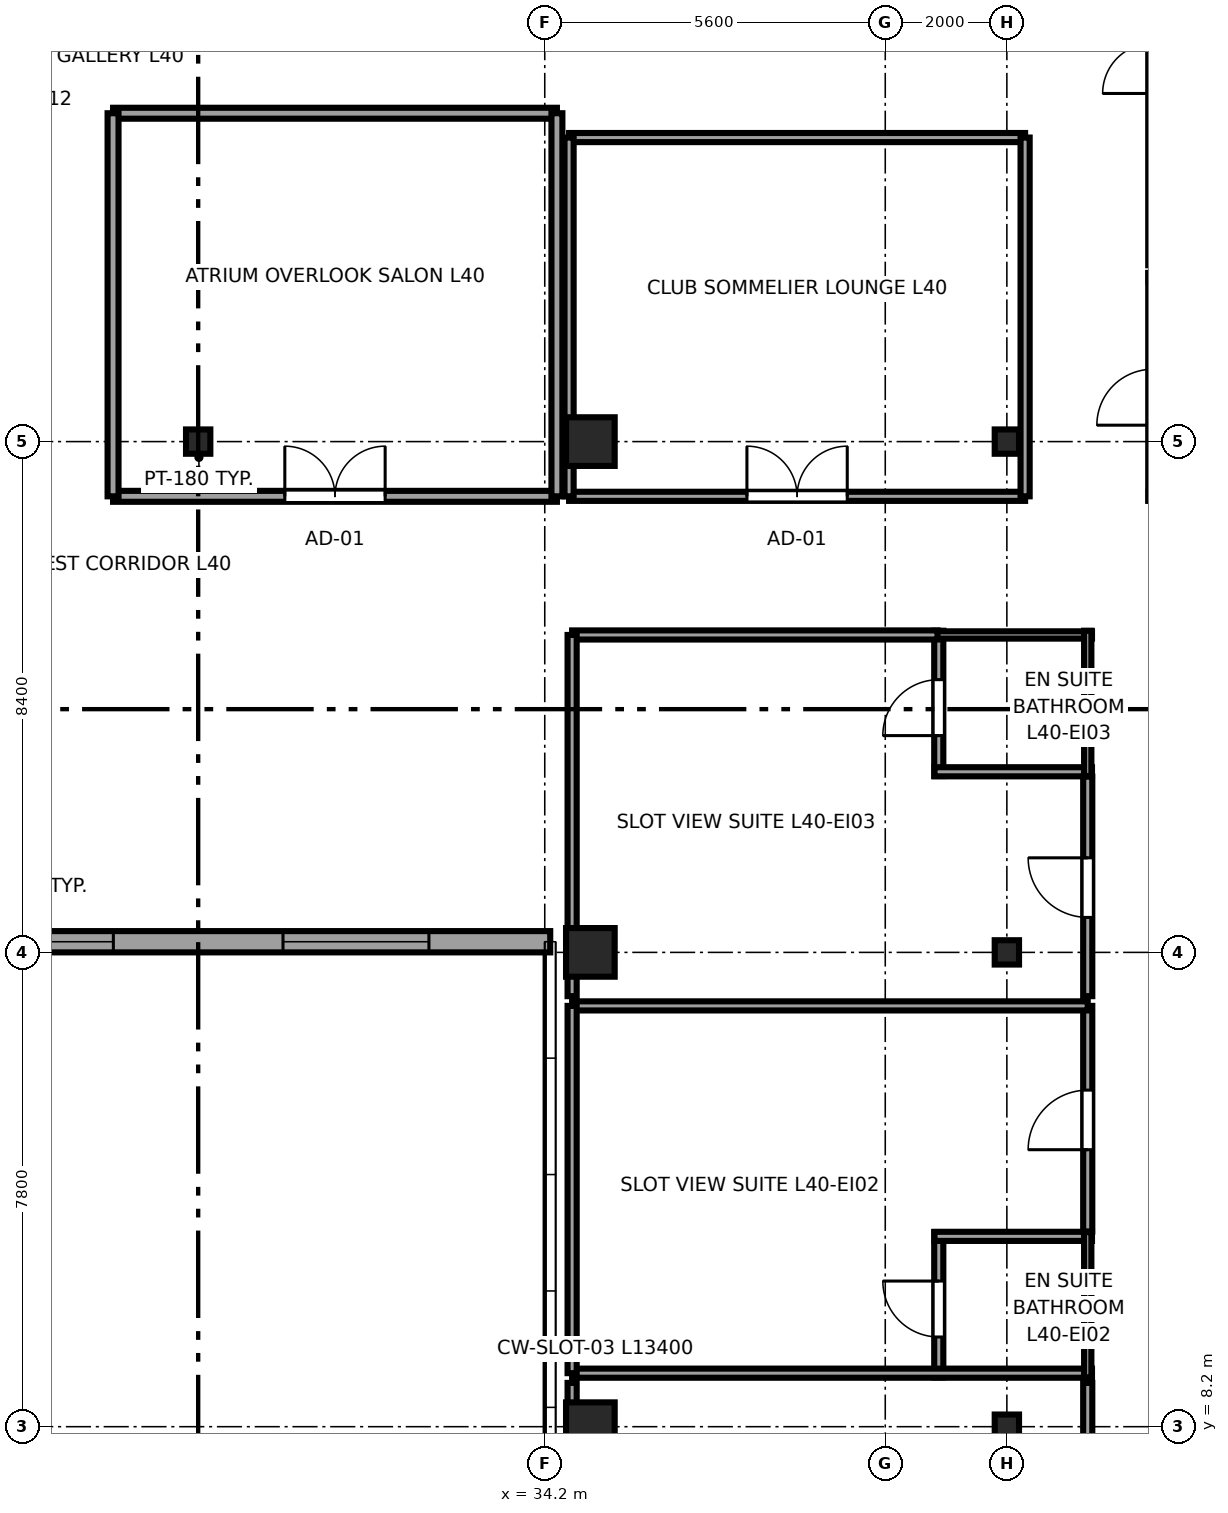
"""IFC4 building model, lengths in metres.
Left out: names, types, materials, properties, quantities, classifications, styles, units other than length and angle.
Written with IfcOpenShell. Run it as: python <this file> out.ifc"""

import sys

from ifc_helpers import new_model, si_unit, direction, frame, frame_2d, origin, origin_2d, place, context, subcontext, project, spatial, rectangle, i_section, extrude, source, transform, mapped, element, fill, save


model = new_model("IFC4")
c1 = context("Model", 3, precision=1e-05, world=origin(), true_north=direction((0.0, 1.0)))
c2 = subcontext(c1, "Body", "Model", "MODEL_VIEW")
j1 = project(units=[si_unit("LENGTHUNIT", "METRE"), si_unit("PLANEANGLEUNIT", "RADIAN")], contexts=[c1])
p1 = place(None, origin())
s1 = spatial("IfcSite", under=j1, at=p1, CompositionType="ELEMENT")
p2 = place(p1, origin())
s2 = spatial("IfcBuilding", under=s1, at=p2, CompositionType="ELEMENT")
p3 = place(p2, frame((0.0, 0.0, 154.15)))
s3 = spatial("IfcBuildingStorey", under=s2, at=p3, CompositionType="ELEMENT", Elevation=154.15)
m1 = source(origin(), c2, "Body", "SweptSolid", [
    extrude(rectangle(XDim=0.8, YDim=0.8, at=origin_2d()), origin(), (0.0, 0.0, 1.0), 3.55),
])
for number, where, z_axis, x_axis in (
    (1, (34.95, 8.2, 0.0), (0.0, 0.0, 1.0), (1.0, 0.0, 0.0)),
    (2, (34.95, 16.0, 0.0), (0.0, 0.0, 1.0), (1.0, 0.0, 0.0)),
    (3, (34.95, 24.4, 0.0), (0.0, 0.0, 1.0), (1.0, 0.0, 0.0)),
):
    element("IfcColumn", number, at=place(p3, frame(where, z_axis=z_axis, x_axis=x_axis)), inside=s3, PredefinedType="COLUMN", context=c2, shape_type="MappedRepresentation", body=[
        mapped(m1, transform((0.0, 0.0, 0.0), x_axis=(1.0, 0.0, 0.0), y_axis=(0.0, 1.0, 0.0), z_axis=(0.0, 0.0, 1.0), scale=1.0)),
    ])
m2 = source(origin(), c2, "Body", "SweptSolid", [
    extrude(i_section(OverallWidth=0.4, OverallDepth=0.4, WebThickness=0.02, FlangeThickness=0.035, at=origin_2d()), origin(), (0.0, 0.0, 1.0), 3.55),
])
for number, where, z_axis, x_axis in (
    (4, (41.8, 8.2, 0.0), (0.0, 0.0, 1.0), (1.0, 0.0, 0.0)),
    (5, (41.8, 16.0, 0.0), (0.0, 0.0, 1.0), (1.0, 0.0, 0.0)),
    (6, (41.8, 24.4, 0.0), (0.0, 0.0, 1.0), (1.0, 0.0, 0.0)),
    (7, (28.5, 24.4, 0.0), (0.0, 0.0, 1.0), (1.0, 0.0, 0.0)),
):
    element("IfcColumn", number, at=place(p3, frame(where, z_axis=z_axis, x_axis=x_axis)), inside=s3, PredefinedType="COLUMN", context=c2, shape_type="MappedRepresentation", body=[
        mapped(m2, transform((0.0, 0.0, 0.0), x_axis=(1.0, 0.0, 0.0), y_axis=(0.0, 1.0, 0.0), z_axis=(0.0, 0.0, 1.0), scale=1.0)),
    ])
p4 = place(p3, frame((22.71, 16.175, 0.0), z_axis=(0.0, 0.0, 1.0), x_axis=(1.0, 0.0, 0.0)))
e8 = element("IfcWall", 8, at=p4, inside=s3, PredefinedType="SOLIDWALL", context=c2, shape_type="SweptSolid", body=[
    extrude(rectangle(XDim=11.58, YDim=0.35, at=frame_2d((5.79, 0.0))), origin(), (0.0, 0.0, 1.0), 2.758),
])
p5 = place(p4, frame((1.995, 0.0, 0.68)))
e9 = element("IfcOpeningElement", 9, at=p5, cuts=e8, PredefinedType="OPENING", context=c2, shape_type="SweptSolid", body=[
    extrude(rectangle(XDim=2.4, YDim=1.9, at=frame_2d((1.2, 0.95))), frame((0.0, 0.185, 0.0), z_axis=(0.0, -1.0, 0.0), x_axis=(1.0, 0.0, 0.0)), (0.0, 0.0, 1.0), 0.37),
])
p6 = place(p4, frame((7.185, 0.0, 0.68)))
e10 = element("IfcOpeningElement", 10, at=p6, cuts=e8, PredefinedType="OPENING", context=c2, shape_type="SweptSolid", body=[
    extrude(rectangle(XDim=2.4, YDim=1.9, at=frame_2d((1.2, 0.95))), frame((0.0, 0.185, 0.0), z_axis=(0.0, -1.0, 0.0), x_axis=(1.0, 0.0, 0.0)), (0.0, 0.0, 1.0), 0.37),
])
p7 = place(p3, frame((40.68, 9.01, 0.0), z_axis=(0.0, 0.0, 1.0), x_axis=(0.0, 1.0, 0.0)))
e11 = element("IfcWall", 11, at=p7, inside=s3, PredefinedType="PARTITIONING", context=c2, shape_type="SweptSolid", body=[
    extrude(rectangle(XDim=2.39, YDim=0.15, at=frame_2d((1.195, 0.0))), origin(), (0.0, 0.0, 1.0), 3.37),
])
p8 = place(p7, frame((0.665, 0.0, 0.0)))
e12 = element("IfcOpeningElement", 12, at=p8, cuts=e11, PredefinedType="OPENING", context=c2, shape_type="SweptSolid", body=[
    extrude(rectangle(XDim=0.92, YDim=2.01, at=frame_2d((0.46, 1.005))), frame((0.0, 0.085, 0.0), z_axis=(0.0, -1.0, 0.0), x_axis=(1.0, 0.0, 0.0)), (0.0, 0.0, 1.0), 0.17),
])
p9 = place(p3, frame((34.65, 9.08, 0.0), z_axis=(0.0, 0.0, 1.0), x_axis=(1.0, 0.0, 0.0)))
e13 = element("IfcWall", 13, at=p9, inside=s3, PredefinedType="PARTITIONING", context=c2, shape_type="SweptSolid", body=[
    extrude(rectangle(XDim=8.55, YDim=0.15, at=frame_2d((4.275, 0.0))), origin(), (0.0, 0.0, 1.0), 3.37),
])
p10 = place(p3, frame((40.61, 11.33, 0.0), z_axis=(0.0, 0.0, 1.0), x_axis=(1.0, 0.0, 0.0)))
e14 = element("IfcWall", 14, at=p10, inside=s3, PredefinedType="PARTITIONING", context=c2, shape_type="SweptSolid", body=[
    extrude(rectangle(XDim=2.59, YDim=0.15, at=frame_2d((1.295, 0.0))), origin(), (0.0, 0.0, 1.0), 3.37),
])
p11 = place(p3, frame((43.13, 9.01, 0.0), z_axis=(0.0, 0.0, 1.0), x_axis=(0.0, 1.0, 0.0)))
e15 = element("IfcWall", 15, at=p11, inside=s3, PredefinedType="PLUMBINGWALL", context=c2, shape_type="SweptSolid", body=[
    extrude(rectangle(XDim=2.39, YDim=0.12, at=frame_2d((1.195, 0.0))), origin(), (0.0, 0.0, 1.0), 3.37),
])
p12 = place(p3, frame((40.68, 18.9, 0.0), z_axis=(0.0, 0.0, 1.0), x_axis=(0.0, 1.0, 0.0)))
e16 = element("IfcWall", 16, at=p12, inside=s3, PredefinedType="PARTITIONING", context=c2, shape_type="SweptSolid", body=[
    extrude(rectangle(XDim=2.39, YDim=0.15, at=frame_2d((1.195, 0.0))), origin(), (0.0, 0.0, 1.0), 3.37),
])
p13 = place(p12, frame((0.665, 0.0, 0.0)))
e17 = element("IfcOpeningElement", 17, at=p13, cuts=e16, PredefinedType="OPENING", context=c2, shape_type="SweptSolid", body=[
    extrude(rectangle(XDim=0.92, YDim=2.01, at=frame_2d((0.46, 1.005))), frame((0.0, 0.085, 0.0), z_axis=(0.0, -1.0, 0.0), x_axis=(1.0, 0.0, 0.0)), (0.0, 0.0, 1.0), 0.17),
])
p14 = place(p3, frame((40.61, 18.97, 0.0), z_axis=(0.0, 0.0, 1.0), x_axis=(1.0, 0.0, 0.0)))
e18 = element("IfcWall", 18, at=p14, inside=s3, PredefinedType="PARTITIONING", context=c2, shape_type="SweptSolid", body=[
    extrude(rectangle(XDim=2.59, YDim=0.15, at=frame_2d((1.295, 0.0))), origin(), (0.0, 0.0, 1.0), 3.37),
])
p15 = place(p3, frame((40.61, 21.22, 0.0), z_axis=(0.0, 0.0, 1.0), x_axis=(1.0, 0.0, 0.0)))
e19 = element("IfcWall", 19, at=p15, inside=s3, PredefinedType="PLUMBINGWALL", context=c2, shape_type="SweptSolid", body=[
    extrude(rectangle(XDim=2.59, YDim=0.12, at=frame_2d((1.295, 0.0))), origin(), (0.0, 0.0, 1.0), 3.37),
])
p16 = place(p3, frame((43.13, 18.9, 0.0), z_axis=(0.0, 0.0, 1.0), x_axis=(0.0, 1.0, 0.0)))
e20 = element("IfcWall", 20, at=p16, inside=s3, PredefinedType="PLUMBINGWALL", context=c2, shape_type="SweptSolid", body=[
    extrude(rectangle(XDim=2.39, YDim=0.12, at=frame_2d((1.195, 0.0))), origin(), (0.0, 0.0, 1.0), 3.37),
])
p17 = place(p3, frame((43.13, 5.91, 0.0), z_axis=(0.0, 0.0, 1.0), x_axis=(0.0, 1.0, 0.0)))
e21 = element("IfcWall", 21, at=p17, inside=s3, PredefinedType="PARTITIONING", context=c2, shape_type="SweptSolid", body=[
    extrude(rectangle(XDim=3.01, YDim=0.15, at=frame_2d((1.505, 0.0))), origin(), (0.0, 0.0, 1.0), 3.37),
])
p18 = place(p17, frame((0.995, 0.0, 0.0)))
e22 = element("IfcOpeningElement", 22, at=p18, cuts=e21, PredefinedType="OPENING", context=c2, shape_type="SweptSolid", body=[
    extrude(rectangle(XDim=0.98, YDim=2.12, at=frame_2d((0.49, 1.06))), frame((0.0, 0.085, 0.0), z_axis=(0.0, -1.0, 0.0), x_axis=(1.0, 0.0, 0.0)), (0.0, 0.0, 1.0), 0.17),
])
p19 = place(p3, frame((34.65, 3.005, 0.0), z_axis=(0.0, 0.0, 1.0), x_axis=(0.0, 1.0, 0.0)))
e23 = element("IfcWall", 23, at=p19, inside=s3, PredefinedType="PARTITIONING", context=c2, shape_type="SweptSolid", body=[
    extrude(rectangle(XDim=5.915, YDim=0.15, at=frame_2d((2.958, 0.0))), origin(), (0.0, 0.0, 1.0), 3.37),
])
p20 = place(p3, frame((43.13, 11.41, 0.0), z_axis=(0.0, 0.0, 1.0), x_axis=(0.0, 1.0, 0.0)))
e24 = element("IfcWall", 24, at=p20, inside=s3, PredefinedType="PARTITIONING", context=c2, shape_type="SweptSolid", body=[
    extrude(rectangle(XDim=3.71, YDim=0.15, at=frame_2d((1.855, 0.0))), origin(), (0.0, 0.0, 1.0), 3.37),
])
p21 = place(p20, frame((1.345, 0.0, 0.0)))
e25 = element("IfcOpeningElement", 25, at=p21, cuts=e24, PredefinedType="OPENING", context=c2, shape_type="SweptSolid", body=[
    extrude(rectangle(XDim=0.98, YDim=2.12, at=frame_2d((0.49, 1.06))), frame((0.0, 0.085, 0.0), z_axis=(0.0, -1.0, 0.0), x_axis=(1.0, 0.0, 0.0)), (0.0, 0.0, 1.0), 0.17),
])
p22 = place(p3, frame((34.65, 15.12, 0.0), z_axis=(0.0, 0.0, 1.0), x_axis=(1.0, 0.0, 0.0)))
e26 = element("IfcWall", 26, at=p22, inside=s3, PredefinedType="PARTITIONING", context=c2, shape_type="SweptSolid", body=[
    extrude(rectangle(XDim=8.48, YDim=0.15, at=frame_2d((4.24, 0.0))), origin(), (0.0, 0.0, 1.0), 3.37),
])
p23 = place(p3, frame((34.65, 9.08, 0.0), z_axis=(0.0, 0.0, 1.0), x_axis=(0.0, 1.0, 0.0)))
e27 = element("IfcWall", 27, at=p23, inside=s3, PredefinedType="PARTITIONING", context=c2, shape_type="SweptSolid", body=[
    extrude(rectangle(XDim=6.04, YDim=0.15, at=frame_2d((3.02, 0.0))), origin(), (0.0, 0.0, 1.0), 3.37),
])
p24 = place(p3, frame((43.13, 15.28, 0.0), z_axis=(0.0, 0.0, 1.0), x_axis=(0.0, 1.0, 0.0)))
e28 = element("IfcWall", 28, at=p24, inside=s3, PredefinedType="PARTITIONING", context=c2, shape_type="SweptSolid", body=[
    extrude(rectangle(XDim=3.61, YDim=0.15, at=frame_2d((1.805, 0.0))), origin(), (0.0, 0.0, 1.0), 3.37),
])
p25 = place(p24, frame((1.295, 0.0, 0.0)))
e29 = element("IfcOpeningElement", 29, at=p25, cuts=e28, PredefinedType="OPENING", context=c2, shape_type="SweptSolid", body=[
    extrude(rectangle(XDim=0.98, YDim=2.12, at=frame_2d((0.49, 1.06))), frame((0.0, 0.085, 0.0), z_axis=(0.0, -1.0, 0.0), x_axis=(1.0, 0.0, 0.0)), (0.0, 0.0, 1.0), 0.17),
])
p26 = place(p3, frame((34.65, 21.22, 0.0), z_axis=(0.0, 0.0, 1.0), x_axis=(1.0, 0.0, 0.0)))
e30 = element("IfcWall", 30, at=p26, inside=s3, PredefinedType="PARTITIONING", context=c2, shape_type="SweptSolid", body=[
    extrude(rectangle(XDim=6.01, YDim=0.15, at=frame_2d((3.005, 0.0))), origin(), (0.0, 0.0, 1.0), 3.37),
])
p27 = place(p3, frame((34.65, 15.28, 0.0), z_axis=(0.0, 0.0, 1.0), x_axis=(0.0, 1.0, 0.0)))
e31 = element("IfcWall", 31, at=p27, inside=s3, PredefinedType="PARTITIONING", context=c2, shape_type="SweptSolid", body=[
    extrude(rectangle(XDim=5.94, YDim=0.15, at=frame_2d((2.97, 0.0))), origin(), (0.0, 0.0, 1.0), 3.37),
])
p28 = place(p3, frame((44.2, 23.43, 0.0), z_axis=(0.0, 0.0, 1.0), x_axis=(0.0, 1.0, 0.0)))
e32 = element("IfcWall", 32, at=p28, inside=s3, PredefinedType="PARTITIONING", context=c2, shape_type="SweptSolid", body=[
    extrude(rectangle(XDim=3.74, YDim=0.15, at=frame_2d((1.87, 0.0))), origin(), (0.0, 0.0, 1.0), 3.37),
])
p29 = place(p28, frame((1.24, 0.0, 0.0)))
e33 = element("IfcOpeningElement", 33, at=p29, cuts=e32, PredefinedType="OPENING", context=c2, shape_type="SweptSolid", body=[
    extrude(rectangle(XDim=0.92, YDim=2.01, at=frame_2d((0.46, 1.005))), frame((0.0, 0.085, 0.0), z_axis=(0.0, -1.0, 0.0), x_axis=(1.0, 0.0, 0.0)), (0.0, 0.0, 1.0), 0.17),
])
p30 = place(p3, frame((44.2, 27.3, 0.0), z_axis=(0.0, 0.0, 1.0), x_axis=(0.0, 1.0, 0.0)))
e34 = element("IfcWall", 34, at=p30, inside=s3, PredefinedType="PARTITIONING", context=c2, shape_type="SweptSolid", body=[
    extrude(rectangle(XDim=7.3, YDim=0.15, at=frame_2d((3.65, 0.0))), origin(), (0.0, 0.0, 1.0), 3.37),
])
p31 = place(p30, frame((2.825, 0.0, 0.0)))
e35 = element("IfcOpeningElement", 35, at=p31, cuts=e34, PredefinedType="OPENING", context=c2, shape_type="SweptSolid", body=[
    extrude(rectangle(XDim=1.65, YDim=2.15, at=frame_2d((0.825, 1.075))), frame((0.0, 0.085, 0.0), z_axis=(0.0, -1.0, 0.0), x_axis=(1.0, 0.0, 0.0)), (0.0, 0.0, 1.0), 0.17),
])
p32 = place(p3, frame((27.1, 23.5, 0.0), z_axis=(0.0, 0.0, 1.0), x_axis=(1.0, 0.0, 0.0)))
e36 = element("IfcWall", 36, at=p32, inside=s3, PredefinedType="PARTITIONING", context=c2, shape_type="SweptSolid", body=[
    extrude(rectangle(XDim=7.3, YDim=0.18, at=frame_2d((3.65, 0.0))), origin(), (0.0, 0.0, 1.0), 3.37),
])
p33 = place(p32, frame((2.825, 0.0, 0.0)))
e37 = element("IfcOpeningElement", 37, at=p33, cuts=e36, PredefinedType="OPENING", context=c2, shape_type="SweptSolid", body=[
    extrude(rectangle(XDim=1.65, YDim=2.15, at=frame_2d((0.825, 1.075))), frame((0.0, 0.1, 0.0), z_axis=(0.0, -1.0, 0.0), x_axis=(1.0, 0.0, 0.0)), (0.0, 0.0, 1.0), 0.2),
])
p34 = place(p3, frame((27.1, 29.8, 0.0), z_axis=(0.0, 0.0, 1.0), x_axis=(1.0, 0.0, 0.0)))
e38 = element("IfcWall", 38, at=p34, inside=s3, PredefinedType="PARTITIONING", context=c2, shape_type="SweptSolid", body=[
    extrude(rectangle(XDim=7.3, YDim=0.18, at=frame_2d((3.65, 0.0))), origin(), (0.0, 0.0, 1.0), 3.37),
])
for number, where, z_axis, x_axis in (
    (39, (27.1, 23.5, 0.0), (0.0, 0.0, 1.0), (0.0, 1.0, 0.0)),
    (40, (34.4, 23.5, 0.0), (0.0, 0.0, 1.0), (0.0, 1.0, 0.0)),
):
    element("IfcWall", number, at=place(p3, frame(where, z_axis=z_axis, x_axis=x_axis)), inside=s3, PredefinedType="PARTITIONING", context=c2, shape_type="SweptSolid", body=[
        extrude(rectangle(XDim=6.3, YDim=0.18, at=frame_2d((3.15, 0.0))), origin(), (0.0, 0.0, 1.0), 3.37),
    ])
p35 = place(p3, frame((34.6, 23.5, 0.0), z_axis=(0.0, 0.0, 1.0), x_axis=(1.0, 0.0, 0.0)))
e41 = element("IfcWall", 41, at=p35, inside=s3, PredefinedType="PARTITIONING", context=c2, shape_type="SweptSolid", body=[
    extrude(rectangle(XDim=7.5, YDim=0.15, at=frame_2d((3.75, 0.0))), origin(), (0.0, 0.0, 1.0), 3.37),
])
p36 = place(p35, frame((2.925, 0.0, 0.0)))
e42 = element("IfcOpeningElement", 42, at=p36, cuts=e41, PredefinedType="OPENING", context=c2, shape_type="SweptSolid", body=[
    extrude(rectangle(XDim=1.65, YDim=2.15, at=frame_2d((0.825, 1.075))), frame((0.0, 0.085, 0.0), z_axis=(0.0, -1.0, 0.0), x_axis=(1.0, 0.0, 0.0)), (0.0, 0.0, 1.0), 0.17),
])
p37 = place(p3, frame((34.6, 29.4, 0.0), z_axis=(0.0, 0.0, 1.0), x_axis=(1.0, 0.0, 0.0)))
e43 = element("IfcWall", 43, at=p37, inside=s3, PredefinedType="PARTITIONING", context=c2, shape_type="SweptSolid", body=[
    extrude(rectangle(XDim=7.5, YDim=0.15, at=frame_2d((3.75, 0.0))), origin(), (0.0, 0.0, 1.0), 3.37),
])
p38 = place(p3, frame((34.6, 23.5, 0.0), z_axis=(0.0, 0.0, 1.0), x_axis=(0.0, 1.0, 0.0)))
e44 = element("IfcWall", 44, at=p38, inside=s3, PredefinedType="PARTITIONING", context=c2, shape_type="SweptSolid", body=[
    extrude(rectangle(XDim=5.9, YDim=0.15, at=frame_2d((2.95, 0.0))), origin(), (0.0, 0.0, 1.0), 3.37),
])
p39 = place(p3, frame((42.1, 23.5, 0.0), z_axis=(0.0, 0.0, 1.0), x_axis=(0.0, 1.0, 0.0)))
e45 = element("IfcWall", 45, at=p39, inside=s3, PredefinedType="PARTITIONING", context=c2, shape_type="SweptSolid", body=[
    extrude(rectangle(XDim=5.9, YDim=0.15, at=frame_2d((2.95, 0.0))), origin(), (0.0, 0.0, 1.0), 2.16),
])
m3 = source(origin(), c2, "Body", "SweptSolid", [
    extrude(rectangle(XDim=2.4, YDim=1.9, at=frame_2d((1.2, 0.95))), frame((0.0, 0.09, 0.0), z_axis=(0.0, -1.0, 0.0), x_axis=(1.0, 0.0, 0.0)), (0.0, 0.0, 1.0), 0.06),
])
p40 = place(p5, origin())
e46 = element("IfcWindow", 46, at=p40, inside=s3, PartitioningType="TRIPLE_PANEL_HORIZONTAL", PredefinedType="WINDOW", context=c2, shape_type="MappedRepresentation", body=[
    mapped(m3, transform((0.0, 0.0, 0.0), x_axis=(1.0, 0.0, 0.0), y_axis=(0.0, 1.0, 0.0), z_axis=(0.0, 0.0, 1.0), scale=1.0)),
])
fill(e9, e46)
p41 = place(p6, origin())
e47 = element("IfcWindow", 47, at=p41, inside=s3, PartitioningType="TRIPLE_PANEL_HORIZONTAL", PredefinedType="WINDOW", context=c2, shape_type="MappedRepresentation", body=[
    mapped(m3, transform((0.0, 0.0, 0.0), x_axis=(1.0, 0.0, 0.0), y_axis=(0.0, 1.0, 0.0), z_axis=(0.0, 0.0, 1.0), scale=1.0)),
])
fill(e10, e47)
m4 = source(origin(), c2, "Body", "SweptSolid", [
    extrude(rectangle(XDim=0.92, YDim=2.01, at=frame_2d((0.46, 1.005))), frame((0.0, 0.025, 0.0), z_axis=(0.0, -1.0, 0.0), x_axis=(1.0, 0.0, 0.0)), (0.0, 0.0, 1.0), 0.05),
])
p42 = place(p8, origin())
e48 = element("IfcDoor", 48, at=p42, inside=s3, OperationType="SINGLE_SWING_RIGHT", PredefinedType="DOOR", context=c2, shape_type="MappedRepresentation", body=[
    mapped(m4, transform((0.0, 0.0, 0.0), x_axis=(1.0, 0.0, 0.0), y_axis=(0.0, 1.0, 0.0), z_axis=(0.0, 0.0, 1.0), scale=1.0)),
])
fill(e12, e48)
p43 = place(p13, origin())
e49 = element("IfcDoor", 49, at=p43, inside=s3, OperationType="SINGLE_SWING_LEFT", PredefinedType="DOOR", context=c2, shape_type="MappedRepresentation", body=[
    mapped(m4, transform((0.0, 0.0, 0.0), x_axis=(1.0, 0.0, 0.0), y_axis=(0.0, 1.0, 0.0), z_axis=(0.0, 0.0, 1.0), scale=1.0)),
])
fill(e17, e49)
m5 = source(origin(), c2, "Body", "SweptSolid", [
    extrude(rectangle(XDim=0.98, YDim=2.12, at=frame_2d((0.49, 1.06))), frame((0.0, 0.025, 0.0), z_axis=(0.0, -1.0, 0.0), x_axis=(1.0, 0.0, 0.0)), (0.0, 0.0, 1.0), 0.05),
])
p44 = place(p21, origin())
e50 = element("IfcDoor", 50, at=p44, inside=s3, OperationType="SINGLE_SWING_LEFT", PredefinedType="DOOR", context=c2, shape_type="MappedRepresentation", body=[
    mapped(m5, transform((0.0, 0.0, 0.0), x_axis=(1.0, 0.0, 0.0), y_axis=(0.0, 1.0, 0.0), z_axis=(0.0, 0.0, 1.0), scale=1.0)),
])
fill(e25, e50)
p45 = place(p25, origin())
e51 = element("IfcDoor", 51, at=p45, inside=s3, OperationType="SINGLE_SWING_RIGHT", PredefinedType="DOOR", context=c2, shape_type="MappedRepresentation", body=[
    mapped(m5, transform((0.0, 0.0, 0.0), x_axis=(1.0, 0.0, 0.0), y_axis=(0.0, 1.0, 0.0), z_axis=(0.0, 0.0, 1.0), scale=1.0)),
])
fill(e29, e51)
m6 = source(origin(), c2, "Body", "SweptSolid", [
    extrude(rectangle(XDim=1.65, YDim=2.15, at=frame_2d((0.825, 1.075))), frame((0.0, 0.025, 0.0), z_axis=(0.0, -1.0, 0.0), x_axis=(1.0, 0.0, 0.0)), (0.0, 0.0, 1.0), 0.05),
])
p46 = place(p33, origin())
e52 = element("IfcDoor", 52, at=p46, inside=s3, OperationType="DOUBLE_DOOR_SINGLE_SWING", PredefinedType="DOOR", context=c2, shape_type="MappedRepresentation", body=[
    mapped(m6, transform((0.0, 0.0, 0.0), x_axis=(1.0, 0.0, 0.0), y_axis=(0.0, 1.0, 0.0), z_axis=(0.0, 0.0, 1.0), scale=1.0)),
])
fill(e37, e52)
p47 = place(p36, origin())
e53 = element("IfcDoor", 53, at=p47, inside=s3, OperationType="DOUBLE_DOOR_SINGLE_SWING", PredefinedType="DOOR", context=c2, shape_type="MappedRepresentation", body=[
    mapped(m6, transform((0.0, 0.0, 0.0), x_axis=(1.0, 0.0, 0.0), y_axis=(0.0, 1.0, 0.0), z_axis=(0.0, 0.0, 1.0), scale=1.0)),
])
fill(e42, e53)
save(model, sys.argv[1])
